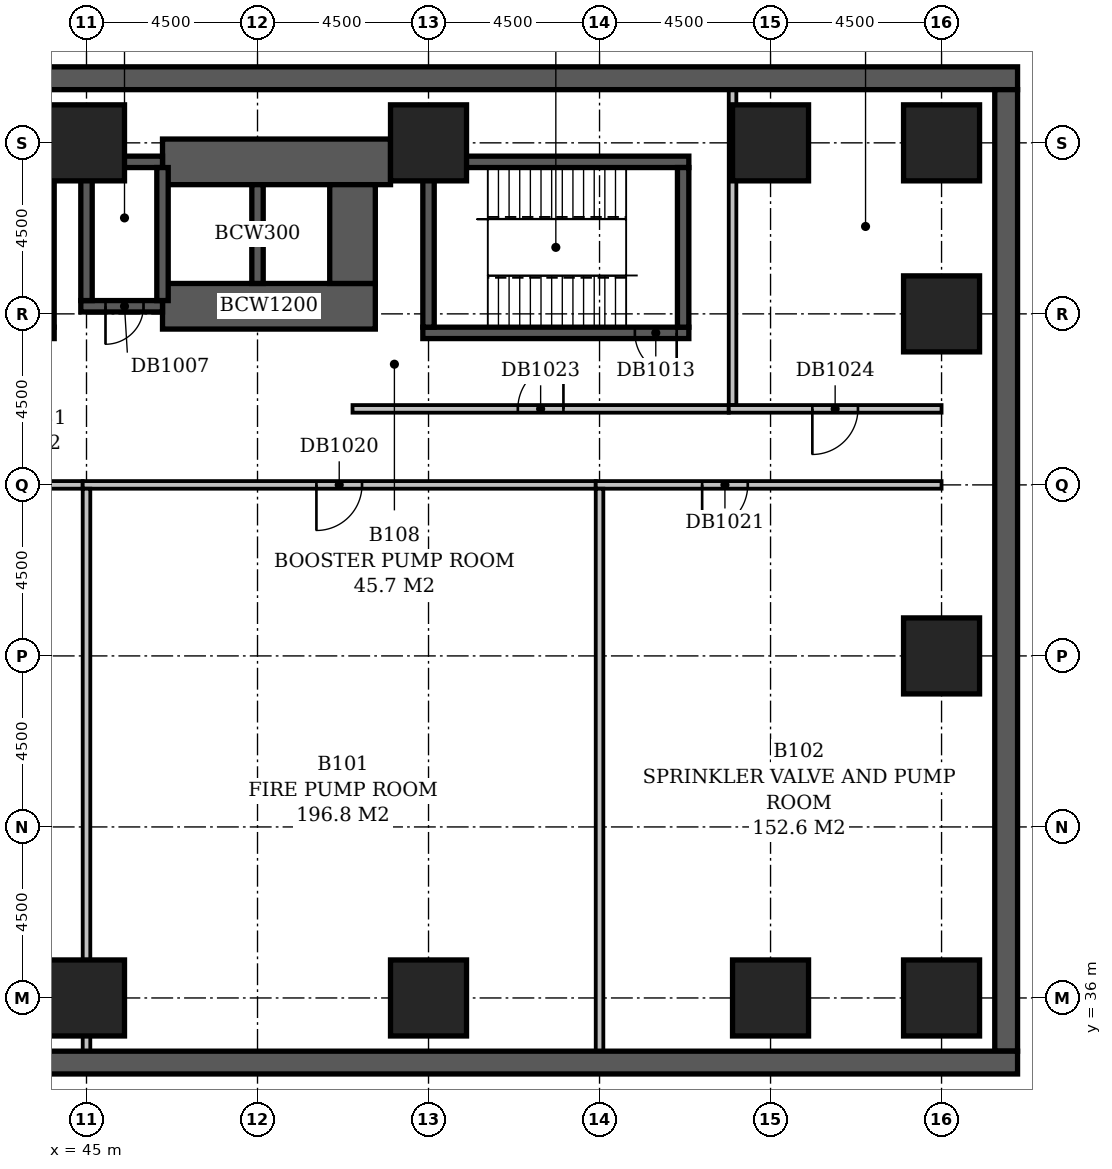
"""IFC4 building model, lengths in metres.
Left out: names, types, materials, properties, quantities, classifications, styles, units other than length and angle.
Written with IfcOpenShell. Run it as: python <this file> out.ifc"""

import sys

from ifc_helpers import new_model, si_unit, direction, frame, frame_2d, origin, origin_2d, place, context, subcontext, project, spatial, rectangle, extrude, element, fill, save


model = new_model("IFC4")
c1 = context("Model", 3, precision=1e-05, world=origin(), true_north=direction((0.0, 1.0)))
c2 = subcontext(c1, "Body", "Model", "MODEL_VIEW")
j1 = project(units=[si_unit("LENGTHUNIT", "METRE"), si_unit("PLANEANGLEUNIT", "RADIAN")], contexts=[c1])
p1 = place(None, origin())
s1 = spatial("IfcSite", under=j1, at=p1, CompositionType="ELEMENT")
p2 = place(p1, origin())
s2 = spatial("IfcBuilding", under=s1, at=p2, CompositionType="ELEMENT")
p3 = place(p2, frame((0.0, 0.0, -4.5)))
s3 = spatial("IfcBuildingStorey", under=s2, at=p3, CompositionType="ELEMENT", Elevation=-4.5)
for number, where, z_axis, x_axis in (
    (1, (45.0, 36.0, -0.4), (0.0, 0.0, 1.0), (1.0, 0.0, 0.0)),
    (2, (54.0, 36.0, -0.4), (0.0, 0.0, 1.0), (1.0, 0.0, 0.0)),
    (3, (63.0, 36.0, -0.4), (0.0, 0.0, 1.0), (1.0, 0.0, 0.0)),
    (4, (67.5, 36.0, -0.4), (0.0, 0.0, 1.0), (1.0, 0.0, 0.0)),
    (5, (67.5, 45.0, -0.4), (0.0, 0.0, 1.0), (1.0, 0.0, 0.0)),
    (6, (67.5, 54.0, -0.4), (0.0, 0.0, 1.0), (1.0, 0.0, 0.0)),
    (7, (45.0, 58.5, -0.4), (0.0, 0.0, 1.0), (1.0, 0.0, 0.0)),
    (8, (54.0, 58.5, -0.4), (0.0, 0.0, 1.0), (1.0, 0.0, 0.0)),
    (9, (63.0, 58.5, -0.4), (0.0, 0.0, 1.0), (1.0, 0.0, 0.0)),
    (10, (67.5, 58.5, -0.4), (0.0, 0.0, 1.0), (1.0, 0.0, 0.0)),
):
    element("IfcColumn", number, at=place(p3, frame(where, z_axis=z_axis, x_axis=x_axis)), inside=s3, PredefinedType="COLUMN", context=c2, shape_type="SweptSolid", body=[
        extrude(rectangle(XDim=2.0, YDim=2.0, at=origin_2d()), origin(), (0.0, 0.0, 1.0), 4.45),
    ])
p4 = place(p3, frame((-2.0, 60.2, -0.4), z_axis=(0.0, 0.0, 1.0), x_axis=(1.0, 0.0, 0.0)))
e11 = element("IfcWall", 11, at=p4, inside=s3, PredefinedType="SOLIDWALL", context=c2, shape_type="SweptSolid", body=[
    extrude(rectangle(XDim=71.5, YDim=0.6, at=frame_2d((35.75, 0.0))), origin(), (0.0, 0.0, 1.0), 4.45),
])
p5 = place(p3, frame((69.2, 59.9, -0.4), z_axis=(0.0, 0.0, 1.0), x_axis=(0.0, -1.0, 0.0)))
e12 = element("IfcWall", 12, at=p5, inside=s3, PredefinedType="SOLIDWALL", context=c2, shape_type="SweptSolid", body=[
    extrude(rectangle(XDim=25.3, YDim=0.6, at=frame_2d((12.65, 0.0))), origin(), (0.0, 0.0, 1.0), 4.45),
])
p6 = place(p3, frame((69.5, 34.3, -0.4), z_axis=(0.0, 0.0, 1.0), x_axis=(-1.0, 0.0, 0.0)))
e13 = element("IfcWall", 13, at=p6, inside=s3, PredefinedType="SOLIDWALL", context=c2, shape_type="SweptSolid", body=[
    extrude(rectangle(XDim=45.6, YDim=0.6, at=frame_2d((22.8, 0.0))), origin(), (0.0, 0.0, 1.0), 4.45),
])
p7 = place(p3, frame((37.15, 53.5, -0.4), z_axis=(0.0, 0.0, 1.0), x_axis=(1.0, 0.0, 0.0)))
e14 = element("IfcWall", 14, at=p7, inside=s3, PredefinedType="SHEAR", context=c2, shape_type="SweptSolid", body=[
    extrude(rectangle(XDim=7.0, YDim=0.3, at=frame_2d((3.5, 0.0))), origin(), (0.0, 0.0, 1.0), 4.45),
])
p8 = place(p7, frame((5.58, 0.0, 0.4)))
e15 = element("IfcOpeningElement", 15, at=p8, cuts=e14, PredefinedType="OPENING", context=c2, shape_type="SweptSolid", body=[
    extrude(rectangle(XDim=1.1, YDim=2.1, at=frame_2d((0.55, 1.05))), frame((0.0, 0.162, 0.0), z_axis=(0.0, -1.0, 0.0), x_axis=(1.0, 0.0, 0.0)), (0.0, 0.0, 1.0), 0.324),
])
p9 = place(p3, frame((53.85, 53.5, -0.4), z_axis=(0.0, 0.0, 1.0), x_axis=(1.0, 0.0, 0.0)))
e16 = element("IfcWall", 16, at=p9, inside=s3, PredefinedType="SHEAR", context=c2, shape_type="SweptSolid", body=[
    extrude(rectangle(XDim=7.0, YDim=0.3, at=frame_2d((3.5, 0.0))), origin(), (0.0, 0.0, 1.0), 4.45),
])
p10 = place(p9, frame((5.58, 0.0, 0.4)))
e17 = element("IfcOpeningElement", 17, at=p10, cuts=e16, PredefinedType="OPENING", context=c2, shape_type="SweptSolid", body=[
    extrude(rectangle(XDim=1.1, YDim=2.1, at=frame_2d((0.55, 1.05))), frame((0.0, 0.162, 0.0), z_axis=(0.0, -1.0, 0.0), x_axis=(1.0, 0.0, 0.0)), (0.0, 0.0, 1.0), 0.324),
])
p11 = place(p3, frame((44.85, 54.2, -0.4), z_axis=(0.0, 0.0, 1.0), x_axis=(1.0, 0.0, 0.0)))
e18 = element("IfcWall", 18, at=p11, inside=s3, PredefinedType="SHEAR", context=c2, shape_type="SweptSolid", body=[
    extrude(rectangle(XDim=2.15, YDim=0.3, at=frame_2d((1.075, 0.0))), origin(), (0.0, 0.0, 1.0), 4.45),
])
p12 = place(p11, frame((0.65, 0.0, 0.4)))
e19 = element("IfcOpeningElement", 19, at=p12, cuts=e18, PredefinedType="OPENING", context=c2, shape_type="SweptSolid", body=[
    extrude(rectangle(XDim=1.0, YDim=2.1, at=frame_2d((0.5, 1.05))), frame((0.0, 0.162, 0.0), z_axis=(0.0, -1.0, 0.0), x_axis=(1.0, 0.0, 0.0)), (0.0, 0.0, 1.0), 0.324),
])
p13 = place(p3, frame((47.0, 54.2, -0.4), z_axis=(0.0, 0.0, 1.0), x_axis=(1.0, 0.0, 0.0)))
e20 = element("IfcWall", 20, at=p13, inside=s3, PredefinedType="SHEAR", context=c2, shape_type="SweptSolid", body=[
    extrude(rectangle(XDim=5.6, YDim=1.2, at=frame_2d((2.8, 0.0))), origin(), (0.0, 0.0, 1.0), 4.45),
])
p14 = place(p3, frame((37.0, 58.0, -0.4), z_axis=(0.0, 0.0, 1.0), x_axis=(1.0, 0.0, 0.0)))
e21 = element("IfcWall", 21, at=p14, inside=s3, PredefinedType="SHEAR", context=c2, shape_type="SweptSolid", body=[
    extrude(rectangle(XDim=7.15, YDim=0.3, at=frame_2d((3.575, 0.0))), origin(), (0.0, 0.0, 1.0), 4.45),
])
p15 = place(p3, frame((44.85, 58.0, -0.4), z_axis=(0.0, 0.0, 1.0), x_axis=(1.0, 0.0, 0.0)))
e22 = element("IfcWall", 22, at=p15, inside=s3, PredefinedType="SHEAR", context=c2, shape_type="SweptSolid", body=[
    extrude(rectangle(XDim=2.15, YDim=0.3, at=frame_2d((1.075, 0.0))), origin(), (0.0, 0.0, 1.0), 4.45),
])
p16 = place(p3, frame((47.0, 58.0, -0.4), z_axis=(0.0, 0.0, 1.0), x_axis=(1.0, 0.0, 0.0)))
e23 = element("IfcWall", 23, at=p16, inside=s3, PredefinedType="SHEAR", context=c2, shape_type="SweptSolid", body=[
    extrude(rectangle(XDim=6.0, YDim=1.2, at=frame_2d((3.0, 0.0))), origin(), (0.0, 0.0, 1.0), 4.45),
])
p17 = place(p3, frame((53.85, 58.0, -0.4), z_axis=(0.0, 0.0, 1.0), x_axis=(1.0, 0.0, 0.0)))
e24 = element("IfcWall", 24, at=p17, inside=s3, PredefinedType="SHEAR", context=c2, shape_type="SweptSolid", body=[
    extrude(rectangle(XDim=7.0, YDim=0.3, at=frame_2d((3.5, 0.0))), origin(), (0.0, 0.0, 1.0), 4.45),
])
p18 = place(p3, frame((44.0, 53.65, -0.4), z_axis=(0.0, 0.0, 1.0), x_axis=(0.0, 1.0, 0.0)))
e25 = element("IfcWall", 25, at=p18, inside=s3, PredefinedType="SHEAR", context=c2, shape_type="SweptSolid", body=[
    extrude(rectangle(XDim=4.2, YDim=0.3, at=frame_2d((2.1, 0.0))), origin(), (0.0, 0.0, 1.0), 4.45),
])
for number, where, z_axis, x_axis in (
    (26, (45.0, 54.35, -0.4), (0.0, 0.0, 1.0), (0.0, 1.0, 0.0)),
    (27, (47.0, 54.35, -0.4), (0.0, 0.0, 1.0), (0.0, 1.0, 0.0)),
):
    element("IfcWall", number, at=place(p3, frame(where, z_axis=z_axis, x_axis=x_axis)), inside=s3, PredefinedType="SHEAR", context=c2, shape_type="SweptSolid", body=[
        extrude(rectangle(XDim=3.5, YDim=0.3, at=frame_2d((1.75, 0.0))), origin(), (0.0, 0.0, 1.0), 4.45),
    ])
p19 = place(p3, frame((49.5, 54.8, -0.4), z_axis=(0.0, 0.0, 1.0), x_axis=(0.0, 1.0, 0.0)))
e28 = element("IfcWall", 28, at=p19, inside=s3, PredefinedType="SHEAR", context=c2, shape_type="SweptSolid", body=[
    extrude(rectangle(XDim=2.6, YDim=0.3, at=frame_2d((1.3, 0.0))), origin(), (0.0, 0.0, 1.0), 4.45),
])
p20 = place(p3, frame((52.0, 54.8, -0.4), z_axis=(0.0, 0.0, 1.0), x_axis=(0.0, 1.0, 0.0)))
e29 = element("IfcWall", 29, at=p20, inside=s3, PredefinedType="SHEAR", context=c2, shape_type="SweptSolid", body=[
    extrude(rectangle(XDim=2.6, YDim=1.2, at=frame_2d((1.3, 0.0))), origin(), (0.0, 0.0, 1.0), 4.45),
])
for number, where, z_axis, x_axis in (
    (30, (54.0, 53.65, -0.4), (0.0, 0.0, 1.0), (0.0, 1.0, 0.0)),
    (31, (60.7, 53.65, -0.4), (0.0, 0.0, 1.0), (0.0, 1.0, 0.0)),
):
    element("IfcWall", number, at=place(p3, frame(where, z_axis=z_axis, x_axis=x_axis)), inside=s3, PredefinedType="SHEAR", context=c2, shape_type="SweptSolid", body=[
        extrude(rectangle(XDim=4.2, YDim=0.3, at=frame_2d((2.1, 0.0))), origin(), (0.0, 0.0, 1.0), 4.45),
    ])
p21 = place(p3, frame((45.0, 34.6, 0.0), z_axis=(0.0, 0.0, 1.0), x_axis=(0.0, 1.0, 0.0)))
e32 = element("IfcWall", 32, at=p21, inside=s3, PredefinedType="PARTITIONING", context=c2, shape_type="SweptSolid", body=[
    extrude(rectangle(XDim=14.8, YDim=0.2, at=frame_2d((7.4, 0.0))), origin(), (0.0, 0.0, 1.0), 3.35),
])
p22 = place(p3, frame((22.6, 49.5, 0.0), z_axis=(0.0, 0.0, 1.0), x_axis=(1.0, 0.0, 0.0)))
e33 = element("IfcWall", 33, at=p22, inside=s3, PredefinedType="PARTITIONING", context=c2, shape_type="SweptSolid", body=[
    extrude(rectangle(XDim=22.3, YDim=0.2, at=frame_2d((11.15, 0.0))), origin(), (0.0, 0.0, 1.0), 4.05),
])
p23 = place(p22, frame((10.25, 0.0, 0.0)))
e34 = element("IfcOpeningElement", 34, at=p23, cuts=e33, PredefinedType="OPENING", context=c2, shape_type="SweptSolid", body=[
    extrude(rectangle(XDim=1.8, YDim=2.4, at=frame_2d((0.9, 1.2))), frame((0.0, 0.112, 0.0), z_axis=(0.0, -1.0, 0.0), x_axis=(1.0, 0.0, 0.0)), (0.0, 0.0, 1.0), 0.224),
])
p24 = place(p3, frame((44.9, 49.5, 0.0), z_axis=(0.0, 0.0, 1.0), x_axis=(1.0, 0.0, 0.0)))
e35 = element("IfcWall", 35, at=p24, inside=s3, PredefinedType="PARTITIONING", context=c2, shape_type="SweptSolid", body=[
    extrude(rectangle(XDim=13.5, YDim=0.2, at=frame_2d((6.75, 0.0))), origin(), (0.0, 0.0, 1.0), 4.05),
])
p25 = place(p24, frame((6.15, 0.0, 0.0)))
e36 = element("IfcOpeningElement", 36, at=p25, cuts=e35, PredefinedType="OPENING", context=c2, shape_type="SweptSolid", body=[
    extrude(rectangle(XDim=1.2, YDim=2.1, at=frame_2d((0.6, 1.05))), frame((0.0, 0.112, 0.0), z_axis=(0.0, -1.0, 0.0), x_axis=(1.0, 0.0, 0.0)), (0.0, 0.0, 1.0), 0.224),
])
p26 = place(p3, frame((58.5, 49.4, 0.0), z_axis=(0.0, 0.0, 1.0), x_axis=(0.0, -1.0, 0.0)))
e37 = element("IfcWall", 37, at=p26, inside=s3, PredefinedType="PARTITIONING", context=c2, shape_type="SweptSolid", body=[
    extrude(rectangle(XDim=14.8, YDim=0.2, at=frame_2d((7.4, 0.0))), origin(), (0.0, 0.0, 1.0), 4.05),
])
p27 = place(p3, frame((58.4, 49.5, 0.0), z_axis=(0.0, 0.0, 1.0), x_axis=(1.0, 0.0, 0.0)))
e38 = element("IfcWall", 38, at=p27, inside=s3, PredefinedType="PARTITIONING", context=c2, shape_type="SweptSolid", body=[
    extrude(rectangle(XDim=9.1, YDim=0.2, at=frame_2d((4.55, 0.0))), origin(), (0.0, 0.0, 1.0), 4.05),
])
p28 = place(p27, frame((2.8, 0.0, 0.0)))
e39 = element("IfcOpeningElement", 39, at=p28, cuts=e38, PredefinedType="OPENING", context=c2, shape_type="SweptSolid", body=[
    extrude(rectangle(XDim=1.2, YDim=2.1, at=frame_2d((0.6, 1.05))), frame((0.0, 0.112, 0.0), z_axis=(0.0, -1.0, 0.0), x_axis=(1.0, 0.0, 0.0)), (0.0, 0.0, 1.0), 0.224),
])
p29 = place(p3, frame((61.9, 51.5, 0.0), z_axis=(0.0, 0.0, 1.0), x_axis=(-1.0, 0.0, 0.0)))
e40 = element("IfcWall", 40, at=p29, inside=s3, PredefinedType="PARTITIONING", context=c2, shape_type="SweptSolid", body=[
    extrude(rectangle(XDim=9.9, YDim=0.2, at=frame_2d((4.95, 0.0))), origin(), (0.0, 0.0, 1.0), 4.05),
])
p30 = place(p29, frame((4.35, 0.0, 0.0)))
e41 = element("IfcOpeningElement", 41, at=p30, cuts=e40, PredefinedType="OPENING", context=c2, shape_type="SweptSolid", body=[
    extrude(rectangle(XDim=1.2, YDim=2.1, at=frame_2d((0.6, 1.05))), frame((0.0, 0.112, 0.0), z_axis=(0.0, -1.0, 0.0), x_axis=(1.0, 0.0, 0.0)), (0.0, 0.0, 1.0), 0.224),
])
p31 = place(p3, frame((67.5, 51.5, 0.0), z_axis=(0.0, 0.0, 1.0), x_axis=(-1.0, 0.0, 0.0)))
e42 = element("IfcWall", 42, at=p31, inside=s3, PredefinedType="PARTITIONING", context=c2, shape_type="SweptSolid", body=[
    extrude(rectangle(XDim=5.6, YDim=0.2, at=frame_2d((2.8, 0.0))), origin(), (0.0, 0.0, 1.0), 4.05),
])
p32 = place(p31, frame((2.2, 0.0, 0.0)))
e43 = element("IfcOpeningElement", 43, at=p32, cuts=e42, PredefinedType="OPENING", context=c2, shape_type="SweptSolid", body=[
    extrude(rectangle(XDim=1.2, YDim=2.1, at=frame_2d((0.6, 1.05))), frame((0.0, 0.112, 0.0), z_axis=(0.0, -1.0, 0.0), x_axis=(1.0, 0.0, 0.0)), (0.0, 0.0, 1.0), 0.224),
])
p33 = place(p3, frame((62.0, 59.9, 0.0), z_axis=(0.0, 0.0, 1.0), x_axis=(0.0, -1.0, 0.0)))
e44 = element("IfcWall", 44, at=p33, inside=s3, PredefinedType="PARTITIONING", context=c2, shape_type="SweptSolid", body=[
    extrude(rectangle(XDim=8.3, YDim=0.2, at=frame_2d((4.15, 0.0))), origin(), (0.0, 0.0, 1.0), 4.05),
])
p34 = place(p12, frame((1.0, 0.0, 0.0), z_axis=(0.0, 0.0, 1.0), x_axis=(-1.0, 0.0, 0.0)))
e45 = element("IfcDoor", 45, at=p34, inside=s3, OperationType="SINGLE_SWING_RIGHT", PredefinedType="DOOR", context=c2, shape_type="SweptSolid", body=[
    extrude(rectangle(XDim=1.0, YDim=2.1, at=frame_2d((0.5, 1.05))), frame((0.0, 0.025, 0.0), z_axis=(0.0, -1.0, 0.0), x_axis=(1.0, 0.0, 0.0)), (0.0, 0.0, 1.0), 0.05),
])
fill(e19, e45)
p35 = place(p10, origin())
e46 = element("IfcDoor", 46, at=p35, inside=s3, OperationType="SINGLE_SWING_RIGHT", PredefinedType="DOOR", context=c2, shape_type="SweptSolid", body=[
    extrude(rectangle(XDim=1.1, YDim=2.1, at=frame_2d((0.55, 1.05))), frame((0.0, 0.025, 0.0), z_axis=(0.0, -1.0, 0.0), x_axis=(1.0, 0.0, 0.0)), (0.0, 0.0, 1.0), 0.05),
])
fill(e17, e46)
p36 = place(p25, frame((1.2, 0.0, 0.0), z_axis=(0.0, 0.0, 1.0), x_axis=(-1.0, 0.0, 0.0)))
e47 = element("IfcDoor", 47, at=p36, inside=s3, OperationType="SINGLE_SWING_RIGHT", PredefinedType="DOOR", context=c2, shape_type="SweptSolid", body=[
    extrude(rectangle(XDim=1.2, YDim=2.1, at=frame_2d((0.6, 1.05))), frame((0.0, 0.025, 0.0), z_axis=(0.0, -1.0, 0.0), x_axis=(1.0, 0.0, 0.0)), (0.0, 0.0, 1.0), 0.05),
])
fill(e36, e47)
p37 = place(p28, frame((1.2, 0.0, 0.0), z_axis=(0.0, 0.0, 1.0), x_axis=(-1.0, 0.0, 0.0)))
e48 = element("IfcDoor", 48, at=p37, inside=s3, OperationType="SINGLE_SWING_RIGHT", PredefinedType="DOOR", context=c2, shape_type="SweptSolid", body=[
    extrude(rectangle(XDim=1.2, YDim=2.1, at=frame_2d((0.6, 1.05))), frame((0.0, 0.025, 0.0), z_axis=(0.0, -1.0, 0.0), x_axis=(1.0, 0.0, 0.0)), (0.0, 0.0, 1.0), 0.05),
])
fill(e39, e48)
p38 = place(p30, frame((1.2, 0.0, 0.0), z_axis=(0.0, 0.0, 1.0), x_axis=(-1.0, 0.0, 0.0)))
e49 = element("IfcDoor", 49, at=p38, inside=s3, OperationType="SINGLE_SWING_RIGHT", PredefinedType="DOOR", context=c2, shape_type="SweptSolid", body=[
    extrude(rectangle(XDim=1.2, YDim=2.1, at=frame_2d((0.6, 1.05))), frame((0.0, 0.025, 0.0), z_axis=(0.0, -1.0, 0.0), x_axis=(1.0, 0.0, 0.0)), (0.0, 0.0, 1.0), 0.05),
])
fill(e41, e49)
p39 = place(p32, frame((1.2, 0.0, 0.0), z_axis=(0.0, 0.0, 1.0), x_axis=(-1.0, 0.0, 0.0)))
e50 = element("IfcDoor", 50, at=p39, inside=s3, OperationType="SINGLE_SWING_LEFT", PredefinedType="DOOR", context=c2, shape_type="SweptSolid", body=[
    extrude(rectangle(XDim=1.2, YDim=2.1, at=frame_2d((0.6, 1.05))), frame((0.0, 0.025, 0.0), z_axis=(0.0, -1.0, 0.0), x_axis=(1.0, 0.0, 0.0)), (0.0, 0.0, 1.0), 0.05),
])
fill(e43, e50)
save(model, sys.argv[1])
